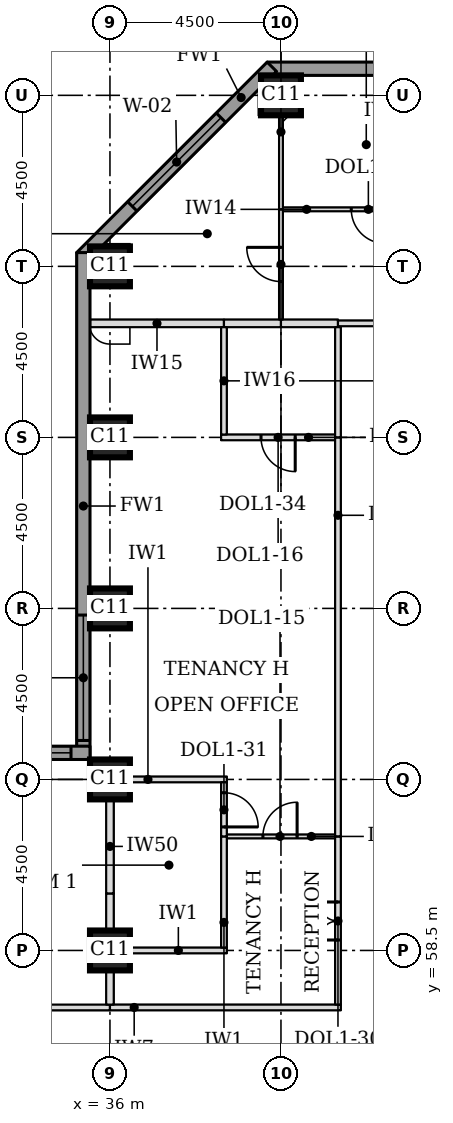
"""IFC4 building model, lengths in metres.
Left out: names, types, materials, properties, quantities, classifications, styles, units other than length and angle.
Written with IfcOpenShell. Run it as: python <this file> out.ifc"""

import sys

from ifc_helpers import new_model, si_unit, direction, frame, frame_2d, origin, origin_2d, place, context, subcontext, project, spatial, rectangle, extrude, element, fill, save


model = new_model("IFC4")
c1 = context("Model", 3, precision=1e-05, world=origin(), true_north=direction((0.0, 1.0)))
c2 = subcontext(c1, "Body", "Model", "MODEL_VIEW")
j1 = project(units=[si_unit("LENGTHUNIT", "METRE"), si_unit("PLANEANGLEUNIT", "RADIAN")], contexts=[c1])
p1 = place(None, origin())
s1 = spatial("IfcSite", under=j1, at=p1, CompositionType="ELEMENT")
p2 = place(p1, origin())
s2 = spatial("IfcBuilding", under=s1, at=p2, CompositionType="ELEMENT")
p3 = place(p2, frame((0.0, 0.0, 82.6)))
s3 = spatial("IfcBuildingStorey", under=s2, at=p3, CompositionType="ELEMENT", Elevation=82.6)
for number, where, z_axis, x_axis in (
    (1, (36.0, 58.5, 0.0), (0.0, 0.0, 1.0), (1.0, 0.0, 0.0)),
    (2, (36.0, 63.0, 0.0), (0.0, 0.0, 1.0), (1.0, 0.0, 0.0)),
    (3, (36.0, 67.5, 0.0), (0.0, 0.0, 1.0), (1.0, 0.0, 0.0)),
    (4, (36.0, 72.0, 0.0), (0.0, 0.0, 1.0), (1.0, 0.0, 0.0)),
    (5, (36.0, 76.5, 0.0), (0.0, 0.0, 1.0), (1.0, 0.0, 0.0)),
    (6, (40.5, 81.0, 0.0), (0.0, 0.0, 1.0), (1.0, 0.0, 0.0)),
):
    element("IfcColumn", number, at=place(p3, frame(where, z_axis=z_axis, x_axis=x_axis)), inside=s3, PredefinedType="COLUMN", context=c2, shape_type="SweptSolid", body=[
        extrude(rectangle(XDim=1.05, YDim=1.05, at=origin_2d()), origin(), (0.0, 0.0, 1.0), 3.7),
    ])
p4 = place(p3, frame((72.362, 81.7, 0.0), z_axis=(0.0, 0.0, 1.0), x_axis=(-1.0, 0.0, 0.0)))
e7 = element("IfcWall", 7, at=p4, inside=s3, PredefinedType="STANDARD", context=c2, shape_type="SweptSolid", body=[
    extrude(rectangle(XDim=32.225, YDim=0.35, at=frame_2d((16.112, 0.0))), origin(), (0.0, 0.0, 1.0), 3.525),
])
p5 = place(p4, frame((5.462, 0.0, 0.9)))
e8 = element("IfcOpeningElement", 8, at=p5, cuts=e7, PredefinedType="OPENING", context=c2, shape_type="SweptSolid", body=[
    extrude(rectangle(XDim=3.3, YDim=1.9, at=frame_2d((1.65, 0.95))), frame((0.0, 0.185, 0.0), z_axis=(0.0, -1.0, 0.0), x_axis=(1.0, 0.0, 0.0)), (0.0, 0.0, 1.0), 0.37),
])
p6 = place(p4, frame((9.962, 0.0, 0.9)))
e9 = element("IfcOpeningElement", 9, at=p6, cuts=e7, PredefinedType="OPENING", context=c2, shape_type="SweptSolid", body=[
    extrude(rectangle(XDim=3.3, YDim=1.9, at=frame_2d((1.65, 0.95))), frame((0.0, 0.185, 0.0), z_axis=(0.0, -1.0, 0.0), x_axis=(1.0, 0.0, 0.0)), (0.0, 0.0, 1.0), 0.37),
])
p7 = place(p4, frame((14.462, 0.0, 0.9)))
e10 = element("IfcOpeningElement", 10, at=p7, cuts=e7, PredefinedType="OPENING", context=c2, shape_type="SweptSolid", body=[
    extrude(rectangle(XDim=3.3, YDim=1.9, at=frame_2d((1.65, 0.95))), frame((0.0, 0.185, 0.0), z_axis=(0.0, -1.0, 0.0), x_axis=(1.0, 0.0, 0.0)), (0.0, 0.0, 1.0), 0.37),
])
p8 = place(p4, frame((18.962, 0.0, 0.9)))
e11 = element("IfcOpeningElement", 11, at=p8, cuts=e7, PredefinedType="OPENING", context=c2, shape_type="SweptSolid", body=[
    extrude(rectangle(XDim=3.3, YDim=1.9, at=frame_2d((1.65, 0.95))), frame((0.0, 0.185, 0.0), z_axis=(0.0, -1.0, 0.0), x_axis=(1.0, 0.0, 0.0)), (0.0, 0.0, 1.0), 0.37),
])
p9 = place(p4, frame((23.462, 0.0, 0.9)))
e12 = element("IfcOpeningElement", 12, at=p9, cuts=e7, PredefinedType="OPENING", context=c2, shape_type="SweptSolid", body=[
    extrude(rectangle(XDim=3.3, YDim=1.9, at=frame_2d((1.65, 0.95))), frame((0.0, 0.185, 0.0), z_axis=(0.0, -1.0, 0.0), x_axis=(1.0, 0.0, 0.0)), (0.0, 0.0, 1.0), 0.37),
])
p10 = place(p3, frame((40.261, 81.751, 0.0), z_axis=(0.0, 0.0, 1.0), x_axis=(-0.707106781187, -0.707106781187, 0.0)))
e13 = element("IfcWall", 13, at=p10, inside=s3, PredefinedType="STANDARD", context=c2, shape_type="SweptSolid", body=[
    extrude(rectangle(XDim=7.089, YDim=0.35, at=frame_2d((3.544, 0.0))), origin(), (0.0, 0.0, 1.0), 3.525),
])
p11 = place(p10, frame((1.894, 0.0, 0.9)))
e14 = element("IfcOpeningElement", 14, at=p11, cuts=e13, PredefinedType="OPENING", context=c2, shape_type="SweptSolid", body=[
    extrude(rectangle(XDim=3.3, YDim=1.9, at=frame_2d((1.65, 0.95))), frame((0.0, 0.185, 0.0), z_axis=(0.0, -1.0, 0.0), x_axis=(1.0, 0.0, 0.0)), (0.0, 0.0, 1.0), 0.37),
])
p12 = place(p3, frame((35.3, 76.862, 0.0), z_axis=(0.0, 0.0, 1.0), x_axis=(0.0, -1.0, 0.0)))
e15 = element("IfcWall", 15, at=p12, inside=s3, PredefinedType="STANDARD", context=c2, shape_type="SweptSolid", body=[
    extrude(rectangle(XDim=13.337, YDim=0.35, at=frame_2d((6.669, 0.0))), origin(), (0.0, 0.0, 1.0), 3.525),
])
p13 = place(p12, frame((9.537, 0.0, 0.9)))
e16 = element("IfcOpeningElement", 16, at=p13, cuts=e15, PredefinedType="OPENING", context=c2, shape_type="SweptSolid", body=[
    extrude(rectangle(XDim=3.3, YDim=1.9, at=frame_2d((1.65, 0.95))), frame((0.0, 0.185, 0.0), z_axis=(0.0, -1.0, 0.0), x_axis=(1.0, 0.0, 0.0)), (0.0, 0.0, 1.0), 0.37),
])
p14 = place(p3, frame((35.475, 63.7, 0.0), z_axis=(0.0, 0.0, 1.0), x_axis=(-1.0, 0.0, 0.0)))
e17 = element("IfcWall", 17, at=p14, inside=s3, PredefinedType="STANDARD", context=c2, shape_type="SweptSolid", body=[
    extrude(rectangle(XDim=17.837, YDim=0.35, at=frame_2d((8.919, 0.0))), origin(), (0.0, 0.0, 1.0), 3.525),
])
p15 = place(p14, frame((0.5, 0.0, 0.9)))
e18 = element("IfcOpeningElement", 18, at=p15, cuts=e17, PredefinedType="OPENING", context=c2, shape_type="SweptSolid", body=[
    extrude(rectangle(XDim=3.3, YDim=1.9, at=frame_2d((1.65, 0.95))), frame((0.0, 0.185, 0.0), z_axis=(0.0, -1.0, 0.0), x_axis=(1.0, 0.0, 0.0)), (0.0, 0.0, 1.0), 0.37),
])
p16 = place(p14, frame((9.075, 0.0, 0.9)))
e19 = element("IfcOpeningElement", 19, at=p16, cuts=e17, PredefinedType="OPENING", context=c2, shape_type="SweptSolid", body=[
    extrude(rectangle(XDim=3.3, YDim=1.9, at=frame_2d((1.65, 0.95))), frame((0.0, 0.185, 0.0), z_axis=(0.0, -1.0, 0.0), x_axis=(1.0, 0.0, 0.0)), (0.0, 0.0, 1.0), 0.37),
])
p17 = place(p3, frame((33.0, 57.0, 0.0), z_axis=(0.0, 0.0, 1.0), x_axis=(1.0, 0.0, 0.0)))
e20 = element("IfcWall", 20, at=p17, inside=s3, PredefinedType="PARTITIONING", context=c2, shape_type="SweptSolid", body=[
    extrude(rectangle(XDim=3.0, YDim=0.15, at=frame_2d((1.5, 0.0))), origin(), (0.0, 0.0, 1.0), 3.55),
])
p18 = place(p3, frame((36.0, 57.0, 0.0), z_axis=(0.0, 0.0, 1.0), x_axis=(1.0, 0.0, 0.0)))
e21 = element("IfcWall", 21, at=p18, inside=s3, PredefinedType="PARTITIONING", context=c2, shape_type="SweptSolid", body=[
    extrude(rectangle(XDim=6.075, YDim=0.15, at=frame_2d((3.038, 0.0))), origin(), (0.0, 0.0, 1.0), 3.55),
])
p19 = place(p3, frame((36.525, 58.5, 0.0), z_axis=(0.0, 0.0, 1.0), x_axis=(1.0, 0.0, 0.0)))
e22 = element("IfcWall", 22, at=p19, inside=s3, PredefinedType="PARTITIONING", context=c2, shape_type="SweptSolid", body=[
    extrude(rectangle(XDim=2.55, YDim=0.15, at=frame_2d((1.275, 0.0))), origin(), (0.0, 0.0, 1.0), 3.55),
])
p20 = place(p3, frame((39.075, 61.5, 0.0), z_axis=(0.0, 0.0, 1.0), x_axis=(1.0, 0.0, 0.0)))
e23 = element("IfcWall", 23, at=p20, inside=s3, PredefinedType="PARTITIONING", context=c2, shape_type="SweptSolid", body=[
    extrude(rectangle(XDim=2.85, YDim=0.1, at=frame_2d((1.425, 0.0))), origin(), (0.0, 0.0, 1.0), 3.55),
])
p21 = place(p20, frame((0.95, 0.0, 0.0)))
e24 = element("IfcOpeningElement", 24, at=p21, cuts=e23, PredefinedType="OPENING", context=c2, shape_type="SweptSolid", body=[
    extrude(rectangle(XDim=0.9, YDim=2.1, at=frame_2d((0.45, 1.05))), frame((0.0, 0.06, 0.0), z_axis=(0.0, -1.0, 0.0), x_axis=(1.0, 0.0, 0.0)), (0.0, 0.0, 1.0), 0.12),
])
p22 = place(p3, frame((36.525, 63.0, 0.0), z_axis=(0.0, 0.0, 1.0), x_axis=(1.0, 0.0, 0.0)))
e25 = element("IfcWall", 25, at=p22, inside=s3, PredefinedType="PARTITIONING", context=c2, shape_type="SweptSolid", body=[
    extrude(rectangle(XDim=2.55, YDim=0.15, at=frame_2d((1.275, 0.0))), origin(), (0.0, 0.0, 1.0), 3.55),
])
p23 = place(p3, frame((38.925, 72.0, 0.0), z_axis=(0.0, 0.0, 1.0), x_axis=(1.0, 0.0, 0.0)))
e26 = element("IfcWall", 26, at=p23, inside=s3, PredefinedType="PARTITIONING", context=c2, shape_type="SweptSolid", body=[
    extrude(rectangle(XDim=3.0, YDim=0.15, at=frame_2d((1.5, 0.0))), origin(), (0.0, 0.0, 1.0), 3.55),
])
p24 = place(p23, frame((1.05, 0.0, 0.0)))
e27 = element("IfcOpeningElement", 27, at=p24, cuts=e26, PredefinedType="OPENING", context=c2, shape_type="SweptSolid", body=[
    extrude(rectangle(XDim=0.9, YDim=2.1, at=frame_2d((0.45, 1.05))), frame((0.0, 0.085, 0.0), z_axis=(0.0, -1.0, 0.0), x_axis=(1.0, 0.0, 0.0)), (0.0, 0.0, 1.0), 0.17),
])
p25 = place(p3, frame((35.475, 75.0, 0.0), z_axis=(0.0, 0.0, 1.0), x_axis=(1.0, 0.0, 0.0)))
e28 = element("IfcWall", 28, at=p25, inside=s3, PredefinedType="PARTITIONING", context=c2, shape_type="SweptSolid", body=[
    extrude(rectangle(XDim=3.525, YDim=0.2, at=frame_2d((1.762, 0.0))), origin(), (0.0, 0.0, 1.0), 3.55),
])
for number, where, z_axis, x_axis in (
    (29, (39.0, 75.0, 0.0), (0.0, 0.0, 1.0), (1.0, 0.0, 0.0)),
    (30, (40.5, 75.0, 0.0), (0.0, 0.0, 1.0), (1.0, 0.0, 0.0)),
):
    element("IfcWall", number, at=place(p3, frame(where, z_axis=z_axis, x_axis=x_axis)), inside=s3, PredefinedType="PARTITIONING", context=c2, shape_type="SweptSolid", body=[
        extrude(rectangle(XDim=1.5, YDim=0.2, at=frame_2d((0.75, 0.0))), origin(), (0.0, 0.0, 1.0), 3.55),
    ])
p26 = place(p3, frame((42.0, 75.0, 0.0), z_axis=(0.0, 0.0, 1.0), x_axis=(1.0, 0.0, 0.0)))
e31 = element("IfcWall", 31, at=p26, inside=s3, PredefinedType="PARTITIONING", context=c2, shape_type="SweptSolid", body=[
    extrude(rectangle(XDim=4.5, YDim=0.15, at=frame_2d((2.25, 0.0))), origin(), (0.0, 0.0, 1.0), 3.55),
])
p27 = place(p26, frame((1.75, 0.0, 0.0)))
e32 = element("IfcOpeningElement", 32, at=p27, cuts=e31, PredefinedType="OPENING", context=c2, shape_type="SweptSolid", body=[
    extrude(rectangle(XDim=1.0, YDim=2.1, at=frame_2d((0.5, 1.05))), frame((0.0, 0.085, 0.0), z_axis=(0.0, -1.0, 0.0), x_axis=(1.0, 0.0, 0.0)), (0.0, 0.0, 1.0), 0.17),
])
p28 = place(p3, frame((40.55, 78.0, 0.0), z_axis=(0.0, 0.0, 1.0), x_axis=(1.0, 0.0, 0.0)))
e33 = element("IfcWall", 33, at=p28, inside=s3, PredefinedType="PARTITIONING", context=c2, shape_type="SweptSolid", body=[
    extrude(rectangle(XDim=4.45, YDim=0.1, at=frame_2d((2.225, 0.0))), origin(), (0.0, 0.0, 1.0), 3.55),
])
p29 = place(p28, frame((1.8, 0.0, 0.0)))
e34 = element("IfcOpeningElement", 34, at=p29, cuts=e33, PredefinedType="OPENING", context=c2, shape_type="SweptSolid", body=[
    extrude(rectangle(XDim=0.9, YDim=2.1, at=frame_2d((0.45, 1.05))), frame((0.0, 0.06, 0.0), z_axis=(0.0, -1.0, 0.0), x_axis=(1.0, 0.0, 0.0)), (0.0, 0.0, 1.0), 0.12),
])
p30 = place(p3, frame((36.0, 57.075, 0.0), z_axis=(0.0, 0.0, 1.0), x_axis=(0.0, 1.0, 0.0)))
e35 = element("IfcWall", 35, at=p30, inside=s3, PredefinedType="PARTITIONING", context=c2, shape_type="SweptSolid", body=[
    extrude(rectangle(XDim=0.9, YDim=0.2, at=frame_2d((0.45, 0.0))), origin(), (0.0, 0.0, 1.0), 2.8),
])
p31 = place(p3, frame((42.0, 57.075, 0.0), z_axis=(0.0, 0.0, 1.0), x_axis=(0.0, 1.0, 0.0)))
e36 = element("IfcWall", 36, at=p31, inside=s3, PredefinedType="PARTITIONING", context=c2, shape_type="SweptSolid", body=[
    extrude(rectangle(XDim=4.425, YDim=0.15, at=frame_2d((2.212, 0.0))), origin(), (0.0, 0.0, 1.0), 3.55),
])
p32 = place(p31, frame((1.7, 0.0, 0.0)))
e37 = element("IfcOpeningElement", 37, at=p32, cuts=e36, PredefinedType="OPENING", context=c2, shape_type="SweptSolid", body=[
    extrude(rectangle(XDim=1.0, YDim=2.1, at=frame_2d((0.5, 1.05))), frame((0.0, 0.085, 0.0), z_axis=(0.0, -1.0, 0.0), x_axis=(1.0, 0.0, 0.0)), (0.0, 0.0, 1.0), 0.17),
])
p33 = place(p3, frame((39.0, 58.575, 0.0), z_axis=(0.0, 0.0, 1.0), x_axis=(0.0, 1.0, 0.0)))
e38 = element("IfcWall", 38, at=p33, inside=s3, PredefinedType="PARTITIONING", context=c2, shape_type="SweptSolid", body=[
    extrude(rectangle(XDim=2.925, YDim=0.15, at=frame_2d((1.462, 0.0))), origin(), (0.0, 0.0, 1.0), 3.55),
])
p34 = place(p3, frame((36.0, 58.995, 0.0), z_axis=(0.0, 0.0, 1.0), x_axis=(0.0, 1.0, 0.0)))
e39 = element("IfcWall", 39, at=p34, inside=s3, PredefinedType="PARTITIONING", context=c2, shape_type="SweptSolid", body=[
    extrude(rectangle(XDim=1.005, YDim=0.2, at=frame_2d((0.502, 0.0))), origin(), (0.0, 0.0, 1.0), 2.8),
])
p35 = place(p3, frame((36.0, 60.0, 0.0), z_axis=(0.0, 0.0, 1.0), x_axis=(0.0, 1.0, 0.0)))
e40 = element("IfcWall", 40, at=p35, inside=s3, PredefinedType="PARTITIONING", context=c2, shape_type="SweptSolid", body=[
    extrude(rectangle(XDim=2.475, YDim=0.2, at=frame_2d((1.238, 0.0))), origin(), (0.0, 0.0, 1.0), 2.8),
])
p36 = place(p3, frame((39.0, 61.5, 0.0), z_axis=(0.0, 0.0, 1.0), x_axis=(0.0, 1.0, 0.0)))
e41 = element("IfcWall", 41, at=p36, inside=s3, PredefinedType="PARTITIONING", context=c2, shape_type="SweptSolid", body=[
    extrude(rectangle(XDim=1.425, YDim=0.15, at=frame_2d((0.712, 0.0))), origin(), (0.0, 0.0, 1.0), 3.55),
])
p37 = place(p36, frame((0.25, 0.0, 0.0)))
e42 = element("IfcOpeningElement", 42, at=p37, cuts=e41, PredefinedType="OPENING", context=c2, shape_type="SweptSolid", body=[
    extrude(rectangle(XDim=0.9, YDim=2.1, at=frame_2d((0.45, 1.05))), frame((0.0, 0.085, 0.0), z_axis=(0.0, -1.0, 0.0), x_axis=(1.0, 0.0, 0.0)), (0.0, 0.0, 1.0), 0.17),
])
p38 = place(p3, frame((42.0, 61.5, 0.0), z_axis=(0.0, 0.0, 1.0), x_axis=(0.0, 1.0, 0.0)))
e43 = element("IfcWall", 43, at=p38, inside=s3, PredefinedType="PARTITIONING", context=c2, shape_type="SweptSolid", body=[
    extrude(rectangle(XDim=10.5, YDim=0.15, at=frame_2d((5.25, 0.0))), origin(), (0.0, 0.0, 1.0), 3.55),
])
p39 = place(p3, frame((42.0, 72.0, 0.0), z_axis=(0.0, 0.0, 1.0), x_axis=(0.0, 1.0, 0.0)))
e44 = element("IfcWall", 44, at=p39, inside=s3, PredefinedType="PARTITIONING", context=c2, shape_type="SweptSolid", body=[
    extrude(rectangle(XDim=2.9, YDim=0.15, at=frame_2d((1.45, 0.0))), origin(), (0.0, 0.0, 1.0), 3.55),
])
p40 = place(p3, frame((39.0, 72.075, 0.0), z_axis=(0.0, 0.0, 1.0), x_axis=(0.0, 1.0, 0.0)))
e45 = element("IfcWall", 45, at=p40, inside=s3, PredefinedType="PARTITIONING", context=c2, shape_type="SweptSolid", body=[
    extrude(rectangle(XDim=2.825, YDim=0.15, at=frame_2d((1.413, 0.0))), origin(), (0.0, 0.0, 1.0), 3.55),
])
p41 = place(p3, frame((40.5, 75.1, 0.0), z_axis=(0.0, 0.0, 1.0), x_axis=(0.0, 1.0, 0.0)))
e46 = element("IfcWall", 46, at=p41, inside=s3, PredefinedType="PARTITIONING", context=c2, shape_type="SweptSolid", body=[
    extrude(rectangle(XDim=2.9, YDim=0.1, at=frame_2d((1.45, 0.0))), origin(), (0.0, 0.0, 1.0), 3.55),
])
p42 = place(p41, frame((1.0, 0.0, 0.0)))
e47 = element("IfcOpeningElement", 47, at=p42, cuts=e46, PredefinedType="OPENING", context=c2, shape_type="SweptSolid", body=[
    extrude(rectangle(XDim=0.9, YDim=2.1, at=frame_2d((0.45, 1.05))), frame((0.0, 0.06, 0.0), z_axis=(0.0, -1.0, 0.0), x_axis=(1.0, 0.0, 0.0)), (0.0, 0.0, 1.0), 0.12),
])
p43 = place(p3, frame((40.5, 78.0, 0.0), z_axis=(0.0, 0.0, 1.0), x_axis=(0.0, 1.0, 0.0)))
e48 = element("IfcWall", 48, at=p43, inside=s3, PredefinedType="PARTITIONING", context=c2, shape_type="SweptSolid", body=[
    extrude(rectangle(XDim=2.475, YDim=0.1, at=frame_2d((1.238, 0.0))), origin(), (0.0, 0.0, 1.0), 3.55),
])
p44 = place(p11, origin())
e49 = element("IfcWindow", 49, at=p44, inside=s3, PartitioningType="SINGLE_PANEL", PredefinedType="WINDOW", context=c2, shape_type="SweptSolid", body=[
    extrude(rectangle(XDim=3.3, YDim=1.9, at=frame_2d((1.65, 0.95))), frame((0.0, 0.085, 0.0), z_axis=(0.0, -1.0, 0.0), x_axis=(1.0, 0.0, 0.0)), (0.0, 0.0, 1.0), 0.06),
])
fill(e14, e49)
p45 = place(p13, origin())
e50 = element("IfcWindow", 50, at=p45, inside=s3, PartitioningType="SINGLE_PANEL", PredefinedType="WINDOW", context=c2, shape_type="SweptSolid", body=[
    extrude(rectangle(XDim=3.3, YDim=1.9, at=frame_2d((1.65, 0.95))), frame((0.0, 0.085, 0.0), z_axis=(0.0, -1.0, 0.0), x_axis=(1.0, 0.0, 0.0)), (0.0, 0.0, 1.0), 0.06),
])
fill(e16, e50)
p46 = place(p15, origin())
e51 = element("IfcWindow", 51, at=p46, inside=s3, PartitioningType="SINGLE_PANEL", PredefinedType="WINDOW", context=c2, shape_type="SweptSolid", body=[
    extrude(rectangle(XDim=3.3, YDim=1.9, at=frame_2d((1.65, 0.95))), frame((0.0, 0.085, 0.0), z_axis=(0.0, -1.0, 0.0), x_axis=(1.0, 0.0, 0.0)), (0.0, 0.0, 1.0), 0.06),
])
fill(e18, e51)
p47 = place(p42, origin())
e52 = element("IfcDoor", 52, at=p47, inside=s3, OperationType="SINGLE_SWING_RIGHT", PredefinedType="DOOR", context=c2, shape_type="SweptSolid", body=[
    extrude(rectangle(XDim=0.9, YDim=2.1, at=frame_2d((0.45, 1.05))), frame((0.0, 0.025, 0.0), z_axis=(0.0, -1.0, 0.0), x_axis=(1.0, 0.0, 0.0)), (0.0, 0.0, 1.0), 0.05),
])
fill(e47, e52)
p48 = place(p29, frame((0.9, 0.0, 0.0), z_axis=(0.0, 0.0, 1.0), x_axis=(-1.0, 0.0, 0.0)))
e53 = element("IfcDoor", 53, at=p48, inside=s3, OperationType="SINGLE_SWING_LEFT", PredefinedType="DOOR", context=c2, shape_type="SweptSolid", body=[
    extrude(rectangle(XDim=0.9, YDim=2.1, at=frame_2d((0.45, 1.05))), frame((0.0, 0.025, 0.0), z_axis=(0.0, -1.0, 0.0), x_axis=(1.0, 0.0, 0.0)), (0.0, 0.0, 1.0), 0.05),
])
fill(e34, e53)
p49 = place(p32, origin())
e54 = element("IfcDoor", 54, at=p49, inside=s3, OperationType="DOUBLE_DOOR_SINGLE_SWING", PredefinedType="DOOR", context=c2, shape_type="SweptSolid", body=[
    extrude(rectangle(XDim=1.0, YDim=2.1, at=frame_2d((0.5, 1.05))), frame((0.0, 0.025, 0.0), z_axis=(0.0, -1.0, 0.0), x_axis=(1.0, 0.0, 0.0)), (0.0, 0.0, 1.0), 0.05),
])
fill(e37, e54)
p50 = place(p21, origin())
e55 = element("IfcDoor", 55, at=p50, inside=s3, OperationType="SINGLE_SWING_RIGHT", PredefinedType="DOOR", context=c2, shape_type="SweptSolid", body=[
    extrude(rectangle(XDim=0.9, YDim=2.1, at=frame_2d((0.45, 1.05))), frame((0.0, 0.025, 0.0), z_axis=(0.0, -1.0, 0.0), x_axis=(1.0, 0.0, 0.0)), (0.0, 0.0, 1.0), 0.05),
])
fill(e24, e55)
p51 = place(p24, frame((0.9, 0.0, 0.0), z_axis=(0.0, 0.0, 1.0), x_axis=(-1.0, 0.0, 0.0)))
e56 = element("IfcDoor", 56, at=p51, inside=s3, OperationType="SINGLE_SWING_LEFT", PredefinedType="DOOR", context=c2, shape_type="SweptSolid", body=[
    extrude(rectangle(XDim=0.9, YDim=2.1, at=frame_2d((0.45, 1.05))), frame((0.0, 0.025, 0.0), z_axis=(0.0, -1.0, 0.0), x_axis=(1.0, 0.0, 0.0)), (0.0, 0.0, 1.0), 0.05),
])
fill(e27, e56)
p52 = place(p37, frame((0.9, 0.0, 0.0), z_axis=(0.0, 0.0, 1.0), x_axis=(-1.0, 0.0, 0.0)))
e57 = element("IfcDoor", 57, at=p52, inside=s3, OperationType="SINGLE_SWING_RIGHT", PredefinedType="DOOR", context=c2, shape_type="SweptSolid", body=[
    extrude(rectangle(XDim=0.9, YDim=2.1, at=frame_2d((0.45, 1.05))), frame((0.0, 0.025, 0.0), z_axis=(0.0, -1.0, 0.0), x_axis=(1.0, 0.0, 0.0)), (0.0, 0.0, 1.0), 0.05),
])
fill(e42, e57)
save(model, sys.argv[1])
